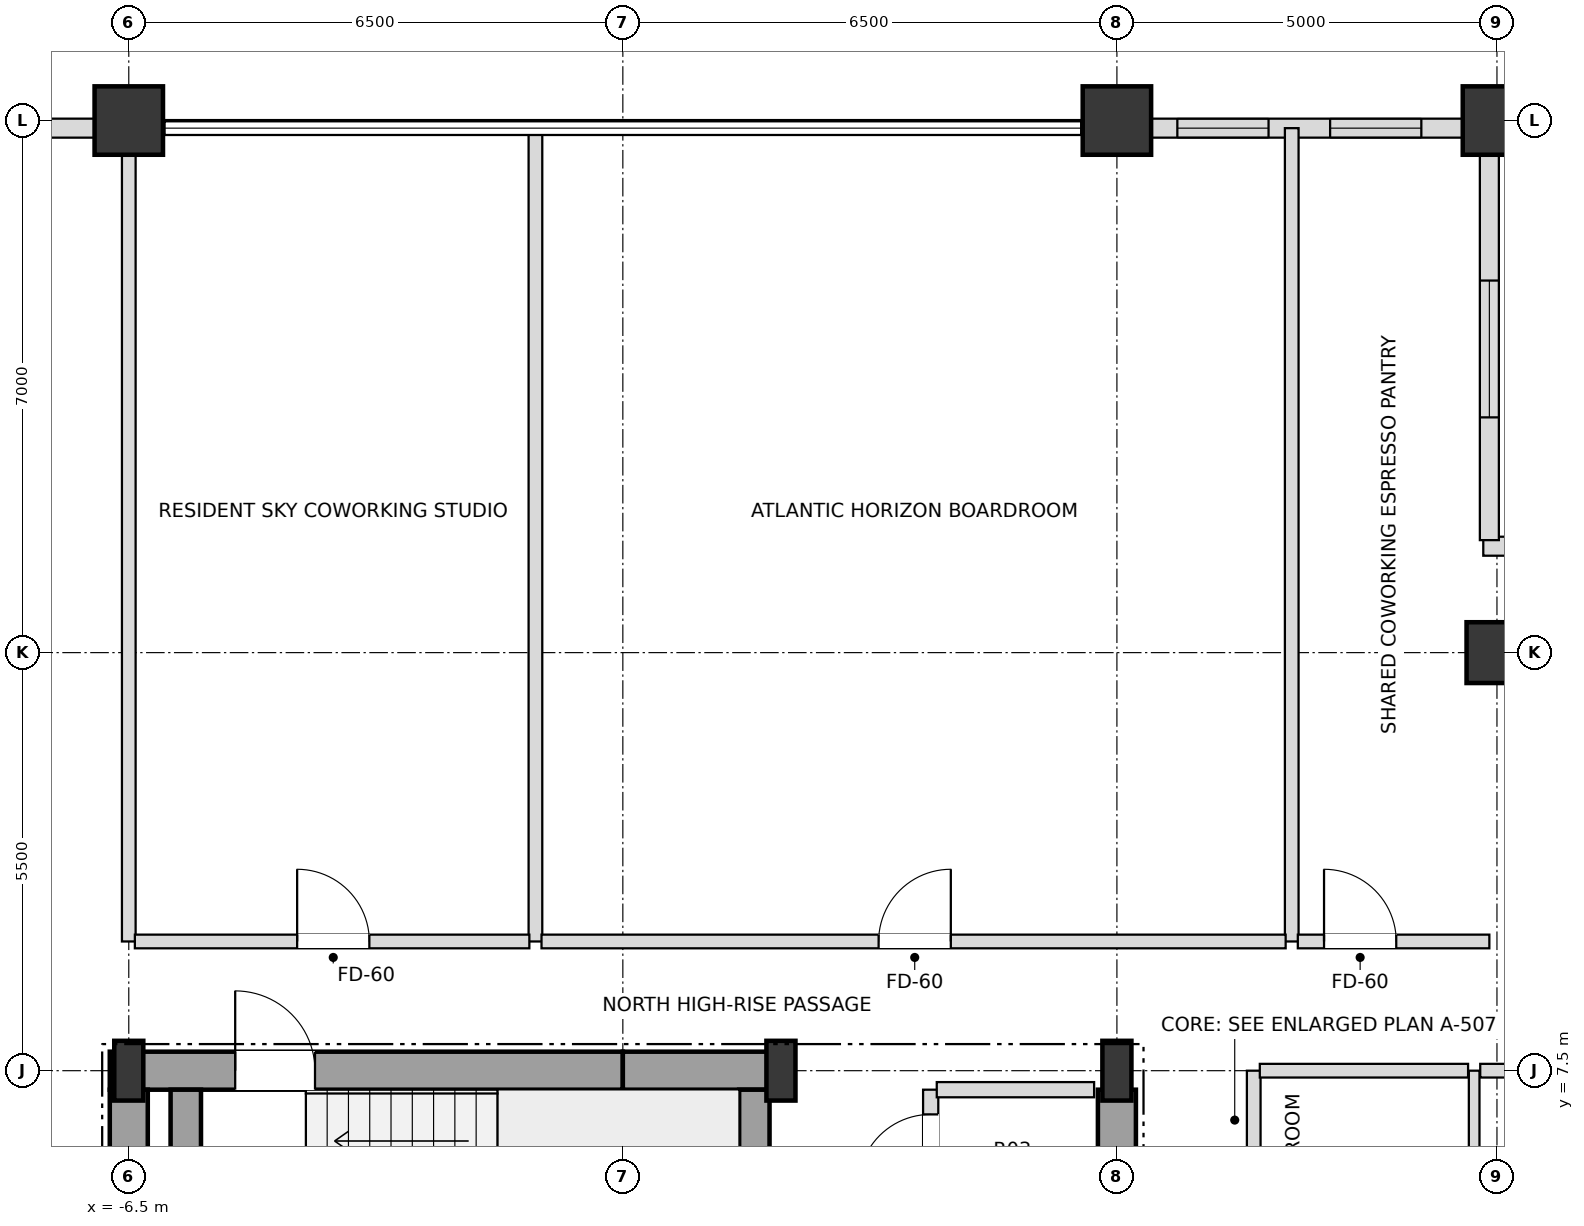
"""IFC4 building model, lengths in metres.
Left out: names, types, materials, properties, quantities, classifications, styles, units other than length and angle.
Written with IfcOpenShell. Run it as: python <this file> out.ifc"""

import sys

from ifc_helpers import new_model, si_unit, direction, frame, frame_2d, origin, origin_2d, place, context, subcontext, project, spatial, rectangle, i_section, extrude, element, fill, save


model = new_model("IFC4")
c1 = context("Model", 3, precision=1e-05, world=origin(), true_north=direction((0.0, 1.0)))
c2 = subcontext(c1, "Body", "Model", "MODEL_VIEW")
j1 = project(units=[si_unit("LENGTHUNIT", "METRE"), si_unit("PLANEANGLEUNIT", "RADIAN")], contexts=[c1])
p1 = place(None, origin())
s1 = spatial("IfcSite", under=j1, at=p1, CompositionType="ELEMENT")
p2 = place(p1, origin())
s2 = spatial("IfcBuilding", under=s1, at=p2, CompositionType="ELEMENT")
p3 = place(p2, frame((0.0, 0.0, 290.7)))
s3 = spatial("IfcBuildingStorey", under=s2, at=p3, CompositionType="ELEMENT", Elevation=290.7)
for number, where, z_axis, x_axis in (
    (1, (-6.5, 7.5, 0.0), (0.0, 0.0, 1.0), (1.0, 0.0, 0.0)),
    (2, (2.08, 7.5, 0.0), (0.0, 0.0, 1.0), (1.0, 0.0, 0.0)),
    (3, (6.5, 7.5, 0.0), (0.0, 0.0, 1.0), (1.0, 0.0, 0.0)),
):
    element("IfcColumn", number, at=place(p3, frame(where, z_axis=z_axis, x_axis=x_axis)), inside=s3, PredefinedType="COLUMN", context=c2, shape_type="SweptSolid", body=[
        extrude(i_section(OverallWidth=0.382, OverallDepth=0.786, WebThickness=0.02, FlangeThickness=0.033, at=origin_2d()), origin(), (0.0, 0.0, 1.0), 3.6),
    ])
for number, where, z_axis, x_axis in (
    (4, (11.5, 20.0, 0.0), (0.0, 0.0, 1.0), (1.0, 0.0, 0.0)),
    (5, (6.5, 20.0, 0.0), (0.0, 0.0, 1.0), (1.0, 0.0, 0.0)),
    (6, (-6.5, 20.0, 0.0), (0.0, 0.0, 1.0), (1.0, 0.0, 0.0)),
):
    element("IfcColumn", number, at=place(p3, frame(where, z_axis=z_axis, x_axis=x_axis)), inside=s3, PredefinedType="USERDEFINED", context=c2, shape_type="SweptSolid", body=[
        extrude(rectangle(XDim=0.9, YDim=0.9, at=origin_2d()), origin(), (0.0, 0.0, 1.0), 3.6),
    ])
p4 = place(p3, frame((11.5, 13.0, 0.0), z_axis=(0.0, 0.0, 1.0), x_axis=(1.0, 0.0, 0.0)))
e7 = element("IfcColumn", 7, at=p4, inside=s3, PredefinedType="COLUMN", context=c2, shape_type="SweptSolid", body=[
    extrude(rectangle(XDim=0.8, YDim=0.8, at=origin_2d()), origin(), (0.0, 0.0, 1.0), 3.6),
])
p5 = place(p3, frame((11.055, 19.9, 0.0), z_axis=(0.0, 0.0, 1.0), x_axis=(-1.0, 0.0, 0.0)))
e8 = element("IfcWall", 8, at=p5, inside=s3, PredefinedType="SOLIDWALL", context=c2, shape_type="SweptSolid", body=[
    extrude(rectangle(XDim=4.11, YDim=0.25, at=frame_2d((2.055, 0.0))), origin(), (0.0, 0.0, 1.0), 2.748),
])
p6 = place(p5, frame((0.55, 0.0, 0.72)))
e9 = element("IfcOpeningElement", 9, at=p6, cuts=e8, PredefinedType="OPENING", context=c2, shape_type="SweptSolid", body=[
    extrude(rectangle(XDim=1.2, YDim=1.68, at=frame_2d((0.6, 0.84))), frame((0.0, 0.135, 0.0), z_axis=(0.0, -1.0, 0.0), x_axis=(1.0, 0.0, 0.0)), (0.0, 0.0, 1.0), 0.27),
])
p7 = place(p5, frame((2.56, 0.0, 0.72)))
e10 = element("IfcOpeningElement", 10, at=p7, cuts=e8, PredefinedType="OPENING", context=c2, shape_type="SweptSolid", body=[
    extrude(rectangle(XDim=1.2, YDim=1.68, at=frame_2d((0.6, 0.84))), frame((0.0, 0.135, 0.0), z_axis=(0.0, -1.0, 0.0), x_axis=(1.0, 0.0, 0.0)), (0.0, 0.0, 1.0), 0.27),
])
p8 = place(p3, frame((-6.945, 19.9, 0.0), z_axis=(0.0, 0.0, 1.0), x_axis=(-1.0, 0.0, 0.0)))
e11 = element("IfcWall", 11, at=p8, inside=s3, PredefinedType="SOLIDWALL", context=c2, shape_type="SweptSolid", body=[
    extrude(rectangle(XDim=4.11, YDim=0.25, at=frame_2d((2.055, 0.0))), origin(), (0.0, 0.0, 1.0), 2.748),
])
p9 = place(p8, frame((1.155, 0.0, 0.72)))
e12 = element("IfcOpeningElement", 12, at=p9, cuts=e11, PredefinedType="OPENING", context=c2, shape_type="SweptSolid", body=[
    extrude(rectangle(XDim=1.8, YDim=1.68, at=frame_2d((0.9, 0.84))), frame((0.0, 0.135, 0.0), z_axis=(0.0, -1.0, 0.0), x_axis=(1.0, 0.0, 0.0)), (0.0, 0.0, 1.0), 0.27),
])
p10 = place(p3, frame((16.98, 14.4, 0.0), z_axis=(0.0, 0.0, 1.0), x_axis=(-1.0, 0.0, 0.0)))
e13 = element("IfcWall", 13, at=p10, inside=s3, PredefinedType="SOLIDWALL", context=c2, shape_type="SweptSolid", body=[
    extrude(rectangle(XDim=5.66, YDim=0.25, at=frame_2d((2.83, 0.0))), origin(), (0.0, 0.0, 1.0), 2.748),
])
p11 = place(p10, frame((0.595, 0.0, 0.72)))
e14 = element("IfcOpeningElement", 14, at=p11, cuts=e13, PredefinedType="OPENING", context=c2, shape_type="SweptSolid", body=[
    extrude(rectangle(XDim=1.8, YDim=1.68, at=frame_2d((0.9, 0.84))), frame((0.0, 0.135, 0.0), z_axis=(0.0, -1.0, 0.0), x_axis=(1.0, 0.0, 0.0)), (0.0, 0.0, 1.0), 0.27),
])
p12 = place(p10, frame((3.265, 0.0, 0.72)))
e15 = element("IfcOpeningElement", 15, at=p12, cuts=e13, PredefinedType="OPENING", context=c2, shape_type="SweptSolid", body=[
    extrude(rectangle(XDim=1.8, YDim=1.68, at=frame_2d((0.9, 0.84))), frame((0.0, 0.135, 0.0), z_axis=(0.0, -1.0, 0.0), x_axis=(1.0, 0.0, 0.0)), (0.0, 0.0, 1.0), 0.27),
])
p13 = place(p3, frame((11.4, 14.48, 0.0), z_axis=(0.0, 0.0, 1.0), x_axis=(0.0, 1.0, 0.0)))
e16 = element("IfcWall", 16, at=p13, inside=s3, PredefinedType="SOLIDWALL", context=c2, shape_type="SweptSolid", body=[
    extrude(rectangle(XDim=5.34, YDim=0.25, at=frame_2d((2.67, 0.0))), origin(), (0.0, 0.0, 1.0), 2.748),
])
p14 = place(p13, frame((1.615, 0.0, 0.72)))
e17 = element("IfcOpeningElement", 17, at=p14, cuts=e16, PredefinedType="OPENING", context=c2, shape_type="SweptSolid", body=[
    extrude(rectangle(XDim=1.8, YDim=1.68, at=frame_2d((0.9, 0.84))), frame((0.0, 0.135, 0.0), z_axis=(0.0, -1.0, 0.0), x_axis=(1.0, 0.0, 0.0)), (0.0, 0.0, 1.0), 0.27),
])
p15 = place(p3, frame((-6.75, 7.5, 0.0), z_axis=(0.0, 0.0, 1.0), x_axis=(1.0, 0.0, 0.0)))
e18 = element("IfcWall", 18, at=p15, inside=s3, PredefinedType="SHEAR", context=c2, shape_type="SweptSolid", body=[
    extrude(rectangle(XDim=6.75, YDim=0.5, at=frame_2d((3.375, 0.0))), origin(), (0.0, 0.0, 1.0), 3.38),
])
p16 = place(p15, frame((1.65, 0.0, 0.0)))
e19 = element("IfcOpeningElement", 19, at=p16, cuts=e18, PredefinedType="OPENING", context=c2, shape_type="SweptSolid", body=[
    extrude(rectangle(XDim=1.05, YDim=2.15, at=frame_2d((0.525, 1.075))), frame((0.0, 0.26, 0.0), z_axis=(0.0, -1.0, 0.0), x_axis=(1.0, 0.0, 0.0)), (0.0, 0.0, 1.0), 0.52),
])
p17 = place(p3, frame((0.0, 7.5, 0.0), z_axis=(0.0, 0.0, 1.0), x_axis=(1.0, 0.0, 0.0)))
e20 = element("IfcWall", 20, at=p17, inside=s3, PredefinedType="SHEAR", context=c2, shape_type="SweptSolid", body=[
    extrude(rectangle(XDim=2.08, YDim=0.5, at=frame_2d((1.04, 0.0))), origin(), (0.0, 0.0, 1.0), 3.38),
])
for number, where, z_axis, x_axis in (
    (21, (-6.5, 3.95, 0.0), (0.0, 0.0, 1.0), (0.0, 1.0, 0.0)),
    (22, (6.5, 3.95, 0.0), (0.0, 0.0, 1.0), (0.0, 1.0, 0.0)),
):
    element("IfcWall", number, at=place(p3, frame(where, z_axis=z_axis, x_axis=x_axis)), inside=s3, PredefinedType="SHEAR", context=c2, shape_type="SweptSolid", body=[
        extrude(rectangle(XDim=3.3, YDim=0.5, at=frame_2d((1.65, 0.0))), origin(), (0.0, 0.0, 1.0), 3.38),
    ])
for number, where, z_axis, x_axis in (
    (23, (1.73, 3.95, 0.0), (0.0, 0.0, 1.0), (0.0, 1.0, 0.0)),
    (24, (-5.75, 3.95, 0.0), (0.0, 0.0, 1.0), (0.0, 1.0, 0.0)),
):
    element("IfcWall", number, at=place(p3, frame(where, z_axis=z_axis, x_axis=x_axis)), inside=s3, PredefinedType="SHEAR", context=c2, shape_type="SweptSolid", body=[
        extrude(rectangle(XDim=3.3, YDim=0.4, at=frame_2d((1.65, 0.0))), origin(), (0.0, 0.0, 1.0), 3.38),
    ])
p18 = place(p3, frame((-6.5, 9.2, 0.0), z_axis=(0.0, 0.0, 1.0), x_axis=(0.0, 1.0, 0.0)))
e25 = element("IfcWall", 25, at=p18, inside=s3, PredefinedType="PARTITIONING", context=c2, shape_type="SweptSolid", body=[
    extrude(rectangle(XDim=10.7, YDim=0.18, at=frame_2d((5.35, 0.0))), origin(), (0.0, 0.0, 1.0), 2.826),
])
p19 = place(p3, frame((-1.15, 9.2, 0.0), z_axis=(0.0, 0.0, 1.0), x_axis=(0.0, 1.0, 0.0)))
e26 = element("IfcWall", 26, at=p19, inside=s3, PredefinedType="PARTITIONING", context=c2, shape_type="SweptSolid", body=[
    extrude(rectangle(XDim=10.7, YDim=0.18, at=frame_2d((5.35, 0.0))), origin(), (0.0, 0.0, 1.0), 3.018),
])
p20 = place(p3, frame((4.05, 0.45, 0.0), z_axis=(0.0, 0.0, 1.0), x_axis=(0.0, 1.0, 0.0)))
e27 = element("IfcWall", 27, at=p20, inside=s3, PredefinedType="SOLIDWALL", context=c2, shape_type="SweptSolid", body=[
    extrude(rectangle(XDim=6.8, YDim=0.2, at=frame_2d((3.4, 0.0))), origin(), (0.0, 0.0, 1.0), 3.38),
])
p21 = place(p20, frame((1.875, 0.0, 0.0)))
e28 = element("IfcOpeningElement", 28, at=p21, cuts=e27, PredefinedType="OPENING", context=c2, shape_type="SweptSolid", body=[
    extrude(rectangle(XDim=0.95, YDim=2.15, at=frame_2d((0.475, 1.075))), frame((0.0, 0.11, 0.0), z_axis=(0.0, -1.0, 0.0), x_axis=(1.0, 0.0, 0.0)), (0.0, 0.0, 1.0), 0.22),
])
p22 = place(p20, frame((5.525, 0.0, 0.0)))
e29 = element("IfcOpeningElement", 29, at=p22, cuts=e27, PredefinedType="OPENING", context=c2, shape_type="SweptSolid", body=[
    extrude(rectangle(XDim=0.95, YDim=2.15, at=frame_2d((0.475, 1.075))), frame((0.0, 0.11, 0.0), z_axis=(0.0, -1.0, 0.0), x_axis=(1.0, 0.0, 0.0)), (0.0, 0.0, 1.0), 0.22),
])
p23 = place(p3, frame((8.3, -7.5, 0.0), z_axis=(0.0, 0.0, 1.0), x_axis=(0.0, 1.0, 0.0)))
e30 = element("IfcWall", 30, at=p23, inside=s3, PredefinedType="PARTITIONING", context=c2, shape_type="SweptSolid", body=[
    extrude(rectangle(XDim=15.0, YDim=0.18, at=frame_2d((7.5, 0.0))), origin(), (0.0, 0.0, 1.0), 3.38),
])
p24 = place(p23, frame((2.355, 0.0, 0.0)))
e31 = element("IfcOpeningElement", 31, at=p24, cuts=e30, PredefinedType="OPENING", context=c2, shape_type="SweptSolid", body=[
    extrude(rectangle(XDim=0.95, YDim=2.15, at=frame_2d((0.475, 1.075))), frame((0.0, 0.1, 0.0), z_axis=(0.0, -1.0, 0.0), x_axis=(1.0, 0.0, 0.0)), (0.0, 0.0, 1.0), 0.2),
])
p25 = place(p3, frame((8.8, 9.2, 0.0), z_axis=(0.0, 0.0, 1.0), x_axis=(0.0, 1.0, 0.0)))
e32 = element("IfcWall", 32, at=p25, inside=s3, PredefinedType="PARTITIONING", context=c2, shape_type="SweptSolid", body=[
    extrude(rectangle(XDim=10.7, YDim=0.18, at=frame_2d((5.35, 0.0))), origin(), (0.0, 0.0, 1.0), 2.826),
])
p26 = place(p3, frame((11.2, -7.5, 0.0), z_axis=(0.0, 0.0, 1.0), x_axis=(0.0, 1.0, 0.0)))
e33 = element("IfcWall", 33, at=p26, inside=s3, PredefinedType="PARTITIONING", context=c2, shape_type="SweptSolid", body=[
    extrude(rectangle(XDim=15.0, YDim=0.14, at=frame_2d((7.5, 0.0))), origin(), (0.0, 0.0, 1.0), 3.38),
])
p27 = place(p26, frame((3.475, 0.0, 0.0)))
e34 = element("IfcOpeningElement", 34, at=p27, cuts=e33, PredefinedType="OPENING", context=c2, shape_type="SweptSolid", body=[
    extrude(rectangle(XDim=0.95, YDim=2.1, at=frame_2d((0.475, 1.05))), frame((0.0, 0.08, 0.0), z_axis=(0.0, -1.0, 0.0), x_axis=(1.0, 0.0, 0.0)), (0.0, 0.0, 1.0), 0.16),
])
p28 = place(p3, frame((4.13, 7.25, 0.0), z_axis=(0.0, 0.0, 1.0), x_axis=(1.0, 0.0, 0.0)))
e35 = element("IfcWall", 35, at=p28, inside=s3, PredefinedType="SOLIDWALL", context=c2, shape_type="SweptSolid", body=[
    extrude(rectangle(XDim=2.07, YDim=0.2, at=frame_2d((1.035, 0.0))), origin(), (0.0, 0.0, 1.0), 3.38),
])
p29 = place(p3, frame((8.38, 7.5, 0.0), z_axis=(0.0, 0.0, 1.0), x_axis=(1.0, 0.0, 0.0)))
e36 = element("IfcWall", 36, at=p29, inside=s3, PredefinedType="PARTITIONING", context=c2, shape_type="SweptSolid", body=[
    extrude(rectangle(XDim=2.74, YDim=0.18, at=frame_2d((1.37, 0.0))), origin(), (0.0, 0.0, 1.0), 2.826),
])
p30 = place(p3, frame((11.28, 7.5, 0.0), z_axis=(0.0, 0.0, 1.0), x_axis=(1.0, 0.0, 0.0)))
e37 = element("IfcWall", 37, at=p30, inside=s3, PredefinedType="PARTITIONING", context=c2, shape_type="SweptSolid", body=[
    extrude(rectangle(XDim=5.62, YDim=0.18, at=frame_2d((2.81, 0.0))), origin(), (0.0, 0.0, 1.0), 2.826),
])
p31 = place(p3, frame((-6.42, 9.2, 0.0), z_axis=(0.0, 0.0, 1.0), x_axis=(1.0, 0.0, 0.0)))
e38 = element("IfcWall", 38, at=p31, inside=s3, PredefinedType="PARTITIONING", context=c2, shape_type="SweptSolid", body=[
    extrude(rectangle(XDim=5.19, YDim=0.18, at=frame_2d((2.595, 0.0))), origin(), (0.0, 0.0, 1.0), 3.38),
])
p32 = place(p31, frame((2.135, 0.0, 0.0)))
e39 = element("IfcOpeningElement", 39, at=p32, cuts=e38, PredefinedType="OPENING", context=c2, shape_type="SweptSolid", body=[
    extrude(rectangle(XDim=0.95, YDim=2.15, at=frame_2d((0.475, 1.075))), frame((0.0, 0.1, 0.0), z_axis=(0.0, -1.0, 0.0), x_axis=(1.0, 0.0, 0.0)), (0.0, 0.0, 1.0), 0.2),
])
p33 = place(p3, frame((-1.07, 9.2, 0.0), z_axis=(0.0, 0.0, 1.0), x_axis=(1.0, 0.0, 0.0)))
e40 = element("IfcWall", 40, at=p33, inside=s3, PredefinedType="PARTITIONING", context=c2, shape_type="SweptSolid", body=[
    extrude(rectangle(XDim=9.79, YDim=0.18, at=frame_2d((4.895, 0.0))), origin(), (0.0, 0.0, 1.0), 2.826),
])
p34 = place(p33, frame((4.435, 0.0, 0.0)))
e41 = element("IfcOpeningElement", 41, at=p34, cuts=e40, PredefinedType="OPENING", context=c2, shape_type="SweptSolid", body=[
    extrude(rectangle(XDim=0.95, YDim=2.15, at=frame_2d((0.475, 1.075))), frame((0.0, 0.1, 0.0), z_axis=(0.0, -1.0, 0.0), x_axis=(1.0, 0.0, 0.0)), (0.0, 0.0, 1.0), 0.2),
])
p35 = place(p3, frame((8.88, 9.2, 0.0), z_axis=(0.0, 0.0, 1.0), x_axis=(1.0, 0.0, 0.0)))
e42 = element("IfcWall", 42, at=p35, inside=s3, PredefinedType="PARTITIONING", context=c2, shape_type="SweptSolid", body=[
    extrude(rectangle(XDim=2.52, YDim=0.18, at=frame_2d((1.26, 0.0))), origin(), (0.0, 0.0, 1.0), 3.38),
])
p36 = place(p35, frame((0.345, 0.0, 0.0)))
e43 = element("IfcOpeningElement", 43, at=p36, cuts=e42, PredefinedType="OPENING", context=c2, shape_type="SweptSolid", body=[
    extrude(rectangle(XDim=0.95, YDim=2.15, at=frame_2d((0.475, 1.075))), frame((0.0, 0.1, 0.0), z_axis=(0.0, -1.0, 0.0), x_axis=(1.0, 0.0, 0.0)), (0.0, 0.0, 1.0), 0.2),
])
p37 = place(p6, origin())
e44 = element("IfcWindow", 44, at=p37, inside=s3, PartitioningType="SINGLE_PANEL", PredefinedType="WINDOW", context=c2, shape_type="SweptSolid", body=[
    extrude(rectangle(XDim=1.2, YDim=1.68, at=frame_2d((0.6, 0.84))), frame((0.0, 0.03, 0.0), z_axis=(0.0, -1.0, 0.0), x_axis=(1.0, 0.0, 0.0)), (0.0, 0.0, 1.0), 0.06),
])
fill(e9, e44)
p38 = place(p7, origin())
e45 = element("IfcWindow", 45, at=p38, inside=s3, PartitioningType="SINGLE_PANEL", PredefinedType="WINDOW", context=c2, shape_type="SweptSolid", body=[
    extrude(rectangle(XDim=1.2, YDim=1.68, at=frame_2d((0.6, 0.84))), frame((0.0, 0.03, 0.0), z_axis=(0.0, -1.0, 0.0), x_axis=(1.0, 0.0, 0.0)), (0.0, 0.0, 1.0), 0.06),
])
fill(e10, e45)
p39 = place(p14, origin())
e46 = element("IfcWindow", 46, at=p39, inside=s3, PartitioningType="SINGLE_PANEL", PredefinedType="WINDOW", context=c2, shape_type="SweptSolid", body=[
    extrude(rectangle(XDim=1.8, YDim=1.68, at=frame_2d((0.9, 0.84))), frame((0.0, 0.03, 0.0), z_axis=(0.0, -1.0, 0.0), x_axis=(1.0, 0.0, 0.0)), (0.0, 0.0, 1.0), 0.06),
])
fill(e17, e46)
p40 = place(p16, origin())
e47 = element("IfcDoor", 47, at=p40, inside=s3, OperationType="SINGLE_SWING_LEFT", PredefinedType="DOOR", context=c2, shape_type="SweptSolid", body=[
    extrude(rectangle(XDim=1.05, YDim=2.15, at=frame_2d((0.525, 1.075))), frame((0.0, 0.025, 0.0), z_axis=(0.0, -1.0, 0.0), x_axis=(1.0, 0.0, 0.0)), (0.0, 0.0, 1.0), 0.05),
])
fill(e19, e47)
p41 = place(p22, origin())
e48 = element("IfcDoor", 48, at=p41, inside=s3, OperationType="SINGLE_SWING_LEFT", PredefinedType="DOOR", context=c2, shape_type="SweptSolid", body=[
    extrude(rectangle(XDim=0.95, YDim=2.15, at=frame_2d((0.475, 1.075))), frame((0.0, 0.025, 0.0), z_axis=(0.0, -1.0, 0.0), x_axis=(1.0, 0.0, 0.0)), (0.0, 0.0, 1.0), 0.05),
])
fill(e29, e48)
p42 = place(p32, origin())
e49 = element("IfcDoor", 49, at=p42, inside=s3, OperationType="SINGLE_SWING_LEFT", PredefinedType="DOOR", context=c2, shape_type="SweptSolid", body=[
    extrude(rectangle(XDim=0.95, YDim=2.15, at=frame_2d((0.475, 1.075))), frame((0.0, 0.025, 0.0), z_axis=(0.0, -1.0, 0.0), x_axis=(1.0, 0.0, 0.0)), (0.0, 0.0, 1.0), 0.05),
])
fill(e39, e49)
p43 = place(p34, origin())
e50 = element("IfcDoor", 50, at=p43, inside=s3, OperationType="SINGLE_SWING_RIGHT", PredefinedType="DOOR", context=c2, shape_type="SweptSolid", body=[
    extrude(rectangle(XDim=0.95, YDim=2.15, at=frame_2d((0.475, 1.075))), frame((0.0, 0.025, 0.0), z_axis=(0.0, -1.0, 0.0), x_axis=(1.0, 0.0, 0.0)), (0.0, 0.0, 1.0), 0.05),
])
fill(e41, e50)
p44 = place(p36, origin())
e51 = element("IfcDoor", 51, at=p44, inside=s3, OperationType="SINGLE_SWING_LEFT", PredefinedType="DOOR", context=c2, shape_type="SweptSolid", body=[
    extrude(rectangle(XDim=0.95, YDim=2.15, at=frame_2d((0.475, 1.075))), frame((0.0, 0.025, 0.0), z_axis=(0.0, -1.0, 0.0), x_axis=(1.0, 0.0, 0.0)), (0.0, 0.0, 1.0), 0.05),
])
fill(e43, e51)
save(model, sys.argv[1])
